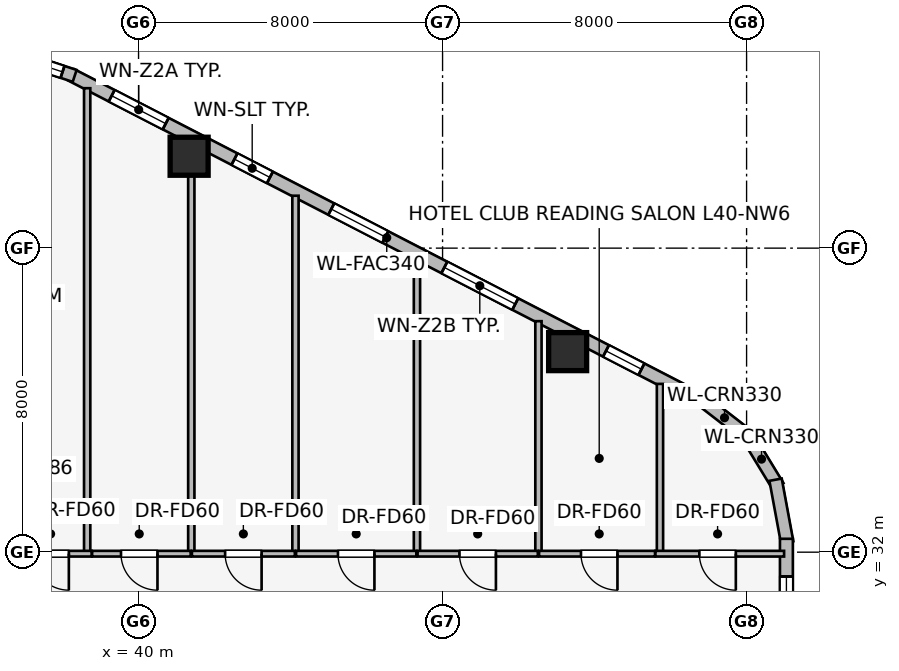
"""IFC4 building model, lengths in metres.
Left out: names, types, materials, properties, quantities, classifications, styles, units other than length and angle.
Written with IfcOpenShell. Run it as: python <this file> out.ifc"""

import sys

from ifc_helpers import new_model, si_unit, direction, frame, frame_2d, origin, origin_2d, place, context, subcontext, project, spatial, rectangle, extrude, element, fill, save


model = new_model("IFC4")
c1 = context("Model", 3, precision=1e-05, world=origin(), true_north=direction((0.0, 1.0)))
c2 = subcontext(c1, "Body", "Model", "MODEL_VIEW")
j1 = project(units=[si_unit("LENGTHUNIT", "METRE"), si_unit("PLANEANGLEUNIT", "RADIAN")], contexts=[c1])
p1 = place(None, origin())
s1 = spatial("IfcSite", under=j1, at=p1, CompositionType="ELEMENT")
p2 = place(p1, origin())
s2 = spatial("IfcBuilding", under=s1, at=p2, CompositionType="ELEMENT")
p3 = place(p2, frame((0.0, 0.0, 149.85)))
s3 = spatial("IfcBuildingStorey", under=s2, at=p3, CompositionType="ELEMENT", Elevation=149.85)
for number, where, z_axis, x_axis in (
    (1, (51.291, 37.277, 0.0), (0.0, 0.0, 1.0), (1.0, 0.0, 0.0)),
    (2, (41.331, 42.418, 0.0), (0.0, 0.0, 1.0), (1.0, 0.0, 0.0)),
):
    element("IfcColumn", number, at=place(p3, frame(where, z_axis=z_axis, x_axis=x_axis)), inside=s3, PredefinedType="COLUMN", context=c2, shape_type="SweptSolid", body=[
        extrude(rectangle(XDim=1.0, YDim=1.0, at=origin_2d()), origin(), (0.0, 0.0, 1.0), 3.45),
    ])
p4 = place(p3, frame((54.757, 36.05, 0.0), z_axis=(0.0, 0.0, 1.0), x_axis=(0.790621329885, -0.612305408053, 0.0)))
e3 = element("IfcWall", 3, at=p4, inside=s3, PredefinedType="STANDARD", context=c2, shape_type="SweptSolid", body=[
    extrude(rectangle(XDim=1.676, YDim=0.33, at=frame_2d((0.838, 0.0))), origin(), (0.0, 0.0, 1.0), 3.19),
])
p5 = place(p3, frame((55.957, 35.164, 0.0), z_axis=(0.0, 0.0, 1.0), x_axis=(0.520519429557, -0.853849824883, 0.0)))
e4 = element("IfcWall", 4, at=p5, inside=s3, PredefinedType="STANDARD", context=c2, shape_type="SweptSolid", body=[
    extrude(rectangle(XDim=1.677, YDim=0.33, at=frame_2d((0.839, 0.0))), origin(), (0.0, 0.0, 1.0), 3.19),
])
p6 = place(p3, frame((56.763, 33.907, 0.0), z_axis=(0.0, 0.0, 1.0), x_axis=(0.181984991895, -0.983301308209, 0.0)))
e5 = element("IfcWall", 5, at=p6, inside=s3, PredefinedType="STANDARD", context=c2, shape_type="SweptSolid", body=[
    extrude(rectangle(XDim=1.677, YDim=0.33, at=frame_2d((0.838, 0.0))), origin(), (0.0, 0.0, 1.0), 3.19),
])
p7 = place(p3, frame((38.231, 44.558, 0.0), z_axis=(0.0, 0.0, 1.0), x_axis=(0.888613612362, -0.458656568606, 0.0)))
e6 = element("IfcWall", 6, at=p7, inside=s3, PredefinedType="STANDARD", context=c2, shape_type="SweptSolid", body=[
    extrude(rectangle(XDim=18.681, YDim=0.34, at=frame_2d((9.34, 0.0))), origin(), (0.0, 0.0, 1.0), 3.19),
])
p8 = place(p7, frame((1.195, 0.0, 0.75)))
e7 = element("IfcOpeningElement", 7, at=p8, cuts=e6, PredefinedType="OPENING", context=c2, shape_type="SweptSolid", body=[
    extrude(rectangle(XDim=1.6, YDim=1.55, at=frame_2d((0.8, 0.775))), frame((0.0, 0.18, 0.0), z_axis=(0.0, -1.0, 0.0), x_axis=(1.0, 0.0, 0.0)), (0.0, 0.0, 1.0), 0.36),
])
p9 = place(p7, frame((4.831, 0.0, 0.75)))
e8 = element("IfcOpeningElement", 8, at=p9, cuts=e6, PredefinedType="OPENING", context=c2, shape_type="SweptSolid", body=[
    extrude(rectangle(XDim=1.05, YDim=1.4, at=frame_2d((0.525, 0.7))), frame((0.0, 0.18, 0.0), z_axis=(0.0, -1.0, 0.0), x_axis=(1.0, 0.0, 0.0)), (0.0, 0.0, 1.0), 0.36),
])
p10 = place(p7, frame((7.698, 0.0, 0.75)))
e9 = element("IfcOpeningElement", 9, at=p10, cuts=e6, PredefinedType="OPENING", context=c2, shape_type="SweptSolid", body=[
    extrude(rectangle(XDim=1.6, YDim=1.55, at=frame_2d((0.8, 0.775))), frame((0.0, 0.18, 0.0), z_axis=(0.0, -1.0, 0.0), x_axis=(1.0, 0.0, 0.0)), (0.0, 0.0, 1.0), 0.36),
])
p11 = place(p7, frame((11.046, 0.0, 0.75)))
e10 = element("IfcOpeningElement", 10, at=p11, cuts=e6, PredefinedType="OPENING", context=c2, shape_type="SweptSolid", body=[
    extrude(rectangle(XDim=2.1, YDim=1.5, at=frame_2d((1.05, 0.75))), frame((0.0, 0.18, 0.0), z_axis=(0.0, -1.0, 0.0), x_axis=(1.0, 0.0, 0.0)), (0.0, 0.0, 1.0), 0.36),
])
p12 = place(p7, frame((15.833, 0.0, 0.75)))
e11 = element("IfcOpeningElement", 11, at=p12, cuts=e6, PredefinedType="OPENING", context=c2, shape_type="SweptSolid", body=[
    extrude(rectangle(XDim=1.05, YDim=1.4, at=frame_2d((0.525, 0.7))), frame((0.0, 0.18, 0.0), z_axis=(0.0, -1.0, 0.0), x_axis=(1.0, 0.0, 0.0)), (0.0, 0.0, 1.0), 0.36),
])
p13 = place(p3, frame((36.683, 45.07, 0.0), z_axis=(0.0, 0.0, 1.0), x_axis=(0.949937416267, -0.312440242569, 0.0)))
e12 = element("IfcWall", 12, at=p13, inside=s3, PredefinedType="STANDARD", context=c2, shape_type="SweptSolid", body=[
    extrude(rectangle(XDim=1.722, YDim=0.33, at=frame_2d((0.861, 0.0))), origin(), (0.0, 0.0, 1.0), 3.19),
])
p14 = place(p13, frame((0.336, 0.0, 0.75)))
e13 = element("IfcOpeningElement", 13, at=p14, cuts=e12, PredefinedType="OPENING", context=c2, shape_type="SweptSolid", body=[
    extrude(rectangle(XDim=1.05, YDim=1.4, at=frame_2d((0.525, 0.7))), frame((0.0, 0.175, 0.0), z_axis=(0.0, -1.0, 0.0), x_axis=(1.0, 0.0, 0.0)), (0.0, 0.0, 1.0), 0.35),
])
p15 = place(p3, frame((57.048, 32.352, 0.0), z_axis=(0.0, 0.0, 1.0), x_axis=(0.0, -1.0, 0.0)))
e14 = element("IfcWall", 14, at=p15, inside=s3, PredefinedType="STANDARD", context=c2, shape_type="SweptSolid", body=[
    extrude(rectangle(XDim=16.704, YDim=0.34, at=frame_2d((8.352, 0.0))), origin(), (0.0, 0.0, 1.0), 3.19),
])
p16 = place(p15, frame((0.992, 0.0, 0.75)))
e15 = element("IfcOpeningElement", 15, at=p16, cuts=e14, PredefinedType="OPENING", context=c2, shape_type="SweptSolid", body=[
    extrude(rectangle(XDim=1.05, YDim=1.4, at=frame_2d((0.525, 0.7))), frame((0.0, 0.18, 0.0), z_axis=(0.0, -1.0, 0.0), x_axis=(1.0, 0.0, 0.0)), (0.0, 0.0, 1.0), 0.36),
])
p17 = place(p15, frame((4.935, 0.0, 0.75)))
e16 = element("IfcOpeningElement", 16, at=p17, cuts=e14, PredefinedType="OPENING", context=c2, shape_type="SweptSolid", body=[
    extrude(rectangle(XDim=2.1, YDim=1.5, at=frame_2d((1.05, 0.75))), frame((0.0, 0.18, 0.0), z_axis=(0.0, -1.0, 0.0), x_axis=(1.0, 0.0, 0.0)), (0.0, 0.0, 1.0), 0.36),
])
p18 = place(p15, frame((9.919, 0.0, 0.75)))
e17 = element("IfcOpeningElement", 17, at=p18, cuts=e14, PredefinedType="OPENING", context=c2, shape_type="SweptSolid", body=[
    extrude(rectangle(XDim=1.6, YDim=1.55, at=frame_2d((0.8, 0.775))), frame((0.0, 0.18, 0.0), z_axis=(0.0, -1.0, 0.0), x_axis=(1.0, 0.0, 0.0)), (0.0, 0.0, 1.0), 0.36),
])
p19 = place(p15, frame((14.702, 0.0, 0.75)))
e18 = element("IfcOpeningElement", 18, at=p19, cuts=e14, PredefinedType="OPENING", context=c2, shape_type="SweptSolid", body=[
    extrude(rectangle(XDim=1.05, YDim=1.4, at=frame_2d((0.525, 0.7))), frame((0.0, 0.18, 0.0), z_axis=(0.0, -1.0, 0.0), x_axis=(1.0, 0.0, 0.0)), (0.0, 0.0, 1.0), 0.36),
])
p20 = place(p3, frame((38.648, 31.97, 0.0), z_axis=(0.0, 0.0, 1.0), x_axis=(0.0, 1.0, 0.0)))
e19 = element("IfcWall", 19, at=p20, inside=s3, PredefinedType="PARTITIONING", context=c2, shape_type="SweptSolid", body=[
    extrude(rectangle(XDim=12.238, YDim=0.165, at=frame_2d((6.119, 0.0))), origin(), (0.0, 0.0, 1.0), 3.19),
])
p21 = place(p3, frame((41.388, 31.97, 0.0), z_axis=(0.0, 0.0, 1.0), x_axis=(0.0, 1.0, 0.0)))
e20 = element("IfcWall", 20, at=p21, inside=s3, PredefinedType="PARTITIONING", context=c2, shape_type="SweptSolid", body=[
    extrude(rectangle(XDim=10.823, YDim=0.165, at=frame_2d((5.412, 0.0))), origin(), (0.0, 0.0, 1.0), 2.42),
])
p22 = place(p3, frame((44.129, 31.97, 0.0), z_axis=(0.0, 0.0, 1.0), x_axis=(0.0, 1.0, 0.0)))
e21 = element("IfcWall", 21, at=p22, inside=s3, PredefinedType="PARTITIONING", context=c2, shape_type="SweptSolid", body=[
    extrude(rectangle(XDim=9.409, YDim=0.165, at=frame_2d((4.705, 0.0))), origin(), (0.0, 0.0, 1.0), 3.19),
])
p23 = place(p3, frame((47.326, 31.97, 0.0), z_axis=(0.0, 0.0, 1.0), x_axis=(0.0, 1.0, 0.0)))
e22 = element("IfcWall", 22, at=p23, inside=s3, PredefinedType="PARTITIONING", context=c2, shape_type="SweptSolid", body=[
    extrude(rectangle(XDim=7.759, YDim=0.165, at=frame_2d((3.879, 0.0))), origin(), (0.0, 0.0, 1.0), 3.19),
])
p24 = place(p3, frame((50.523, 31.97, 0.0), z_axis=(0.0, 0.0, 1.0), x_axis=(0.0, 1.0, 0.0)))
e23 = element("IfcWall", 23, at=p24, inside=s3, PredefinedType="PARTITIONING", context=c2, shape_type="SweptSolid", body=[
    extrude(rectangle(XDim=6.108, YDim=0.165, at=frame_2d((3.054, 0.0))), origin(), (0.0, 0.0, 1.0), 3.19),
])
p25 = place(p3, frame((53.721, 31.97, 0.0), z_axis=(0.0, 0.0, 1.0), x_axis=(0.0, 1.0, 0.0)))
e24 = element("IfcWall", 24, at=p25, inside=s3, PredefinedType="PARTITIONING", context=c2, shape_type="SweptSolid", body=[
    extrude(rectangle(XDim=4.458, YDim=0.165, at=frame_2d((2.229, 0.0))), origin(), (0.0, 0.0, 1.0), 3.19),
])
p26 = place(p3, frame((38.768, 31.96, 0.0), z_axis=(0.0, 0.0, 1.0), x_axis=(-1.0, 0.0, 0.0)))
e25 = element("IfcWall", 25, at=p26, inside=s3, PredefinedType="PARTITIONING", context=c2, shape_type="SweptSolid", body=[
    extrude(rectangle(XDim=4.478, YDim=0.15, at=frame_2d((2.239, 0.0))), origin(), (0.0, 0.0, 1.0), 3.19),
])
p27 = place(p26, frame((0.602, 0.0, 0.0)))
e26 = element("IfcOpeningElement", 26, at=p27, cuts=e25, PredefinedType="OPENING", context=c2, shape_type="SweptSolid", body=[
    extrude(rectangle(XDim=0.96, YDim=2.0, at=frame_2d((0.48, 1.0))), frame((0.0, 0.085, 0.0), z_axis=(0.0, -1.0, 0.0), x_axis=(1.0, 0.0, 0.0)), (0.0, 0.0, 1.0), 0.17),
])
p28 = place(p3, frame((41.372, 31.96, 0.0), z_axis=(0.0, 0.0, 1.0), x_axis=(-1.0, 0.0, 0.0)))
e27 = element("IfcWall", 27, at=p28, inside=s3, PredefinedType="PARTITIONING", context=c2, shape_type="SweptSolid", body=[
    extrude(rectangle(XDim=2.594, YDim=0.15, at=frame_2d((1.297, 0.0))), origin(), (0.0, 0.0, 1.0), 3.19),
])
p29 = place(p28, frame((0.874, 0.0, 0.0)))
e28 = element("IfcOpeningElement", 28, at=p29, cuts=e27, PredefinedType="OPENING", context=c2, shape_type="SweptSolid", body=[
    extrude(rectangle(XDim=0.96, YDim=2.0, at=frame_2d((0.48, 1.0))), frame((0.0, 0.085, 0.0), z_axis=(0.0, -1.0, 0.0), x_axis=(1.0, 0.0, 0.0)), (0.0, 0.0, 1.0), 0.17),
])
p30 = place(p3, frame((44.113, 31.96, 0.0), z_axis=(0.0, 0.0, 1.0), x_axis=(-1.0, 0.0, 0.0)))
e29 = element("IfcWall", 29, at=p30, inside=s3, PredefinedType="PARTITIONING", context=c2, shape_type="SweptSolid", body=[
    extrude(rectangle(XDim=2.709, YDim=0.15, at=frame_2d((1.354, 0.0))), origin(), (0.0, 0.0, 1.0), 3.19),
])
p31 = place(p30, frame((0.875, 0.0, 0.0)))
e30 = element("IfcOpeningElement", 30, at=p31, cuts=e29, PredefinedType="OPENING", context=c2, shape_type="SweptSolid", body=[
    extrude(rectangle(XDim=0.96, YDim=2.0, at=frame_2d((0.48, 1.0))), frame((0.0, 0.085, 0.0), z_axis=(0.0, -1.0, 0.0), x_axis=(1.0, 0.0, 0.0)), (0.0, 0.0, 1.0), 0.17),
])
p32 = place(p3, frame((47.31, 31.96, 0.0), z_axis=(0.0, 0.0, 1.0), x_axis=(-1.0, 0.0, 0.0)))
e31 = element("IfcWall", 31, at=p32, inside=s3, PredefinedType="PARTITIONING", context=c2, shape_type="SweptSolid", body=[
    extrude(rectangle(XDim=3.165, YDim=0.15, at=frame_2d((1.583, 0.0))), origin(), (0.0, 0.0, 1.0), 3.19),
])
p33 = place(p32, frame((1.103, 0.0, 0.0)))
e32 = element("IfcOpeningElement", 32, at=p33, cuts=e31, PredefinedType="OPENING", context=c2, shape_type="SweptSolid", body=[
    extrude(rectangle(XDim=0.96, YDim=2.0, at=frame_2d((0.48, 1.0))), frame((0.0, 0.085, 0.0), z_axis=(0.0, -1.0, 0.0), x_axis=(1.0, 0.0, 0.0)), (0.0, 0.0, 1.0), 0.17),
])
p34 = place(p3, frame((50.507, 31.96, 0.0), z_axis=(0.0, 0.0, 1.0), x_axis=(-1.0, 0.0, 0.0)))
e33 = element("IfcWall", 33, at=p34, inside=s3, PredefinedType="PARTITIONING", context=c2, shape_type="SweptSolid", body=[
    extrude(rectangle(XDim=3.165, YDim=0.15, at=frame_2d((1.583, 0.0))), origin(), (0.0, 0.0, 1.0), 3.19),
])
p35 = place(p34, frame((1.103, 0.0, 0.0)))
e34 = element("IfcOpeningElement", 34, at=p35, cuts=e33, PredefinedType="OPENING", context=c2, shape_type="SweptSolid", body=[
    extrude(rectangle(XDim=0.96, YDim=2.0, at=frame_2d((0.48, 1.0))), frame((0.0, 0.085, 0.0), z_axis=(0.0, -1.0, 0.0), x_axis=(1.0, 0.0, 0.0)), (0.0, 0.0, 1.0), 0.17),
])
p36 = place(p3, frame((53.591, 31.96, 0.0), z_axis=(0.0, 0.0, 1.0), x_axis=(-1.0, 0.0, 0.0)))
e35 = element("IfcWall", 35, at=p36, inside=s3, PredefinedType="PARTITIONING", context=c2, shape_type="SweptSolid", body=[
    extrude(rectangle(XDim=3.052, YDim=0.15, at=frame_2d((1.526, 0.0))), origin(), (0.0, 0.0, 1.0), 3.19),
])
p37 = place(p36, frame((0.989, 0.0, 0.0)))
e36 = element("IfcOpeningElement", 36, at=p37, cuts=e35, PredefinedType="OPENING", context=c2, shape_type="SweptSolid", body=[
    extrude(rectangle(XDim=0.96, YDim=2.0, at=frame_2d((0.48, 1.0))), frame((0.0, 0.085, 0.0), z_axis=(0.0, -1.0, 0.0), x_axis=(1.0, 0.0, 0.0)), (0.0, 0.0, 1.0), 0.17),
])
p38 = place(p3, frame((56.987, 31.96, 0.0), z_axis=(0.0, 0.0, 1.0), x_axis=(-1.0, 0.0, 0.0)))
e37 = element("IfcWall", 37, at=p38, inside=s3, PredefinedType="PARTITIONING", context=c2, shape_type="SweptSolid", body=[
    extrude(rectangle(XDim=3.386, YDim=0.15, at=frame_2d((1.693, 0.0))), origin(), (0.0, 0.0, 1.0), 3.19),
])
p39 = place(p38, frame((1.27, 0.0, 0.0)))
e38 = element("IfcOpeningElement", 38, at=p39, cuts=e37, PredefinedType="OPENING", context=c2, shape_type="SweptSolid", body=[
    extrude(rectangle(XDim=0.96, YDim=2.0, at=frame_2d((0.48, 1.0))), frame((0.0, 0.085, 0.0), z_axis=(0.0, -1.0, 0.0), x_axis=(1.0, 0.0, 0.0)), (0.0, 0.0, 1.0), 0.17),
])
p40 = place(p8, origin())
e39 = element("IfcWindow", 39, at=p40, inside=s3, PartitioningType="SINGLE_PANEL", PredefinedType="WINDOW", context=c2, shape_type="SweptSolid", body=[
    extrude(rectangle(XDim=1.6, YDim=1.55, at=frame_2d((0.8, 0.775))), frame((0.0, 0.03, 0.0), z_axis=(0.0, -1.0, 0.0), x_axis=(1.0, 0.0, 0.0)), (0.0, 0.0, 1.0), 0.06),
])
fill(e7, e39)
p41 = place(p9, origin())
e40 = element("IfcWindow", 40, at=p41, inside=s3, PartitioningType="SINGLE_PANEL", PredefinedType="WINDOW", context=c2, shape_type="SweptSolid", body=[
    extrude(rectangle(XDim=1.05, YDim=1.4, at=frame_2d((0.525, 0.7))), frame((0.0, 0.03, 0.0), z_axis=(0.0, -1.0, 0.0), x_axis=(1.0, 0.0, 0.0)), (0.0, 0.0, 1.0), 0.06),
])
fill(e8, e40)
p42 = place(p10, origin())
e41 = element("IfcWindow", 41, at=p42, inside=s3, PartitioningType="SINGLE_PANEL", PredefinedType="WINDOW", context=c2, shape_type="SweptSolid", body=[
    extrude(rectangle(XDim=1.6, YDim=1.55, at=frame_2d((0.8, 0.775))), frame((0.0, 0.03, 0.0), z_axis=(0.0, -1.0, 0.0), x_axis=(1.0, 0.0, 0.0)), (0.0, 0.0, 1.0), 0.06),
])
fill(e9, e41)
p43 = place(p11, origin())
e42 = element("IfcWindow", 42, at=p43, inside=s3, PartitioningType="SINGLE_PANEL", PredefinedType="WINDOW", context=c2, shape_type="SweptSolid", body=[
    extrude(rectangle(XDim=2.1, YDim=1.5, at=frame_2d((1.05, 0.75))), frame((0.0, 0.03, 0.0), z_axis=(0.0, -1.0, 0.0), x_axis=(1.0, 0.0, 0.0)), (0.0, 0.0, 1.0), 0.06),
])
fill(e10, e42)
p44 = place(p12, origin())
e43 = element("IfcWindow", 43, at=p44, inside=s3, PartitioningType="SINGLE_PANEL", PredefinedType="WINDOW", context=c2, shape_type="SweptSolid", body=[
    extrude(rectangle(XDim=1.05, YDim=1.4, at=frame_2d((0.525, 0.7))), frame((0.0, 0.03, 0.0), z_axis=(0.0, -1.0, 0.0), x_axis=(1.0, 0.0, 0.0)), (0.0, 0.0, 1.0), 0.06),
])
fill(e11, e43)
p45 = place(p14, origin())
e44 = element("IfcWindow", 44, at=p45, inside=s3, PartitioningType="SINGLE_PANEL", PredefinedType="WINDOW", context=c2, shape_type="SweptSolid", body=[
    extrude(rectangle(XDim=1.05, YDim=1.4, at=frame_2d((0.525, 0.7))), frame((0.0, 0.03, 0.0), z_axis=(0.0, -1.0, 0.0), x_axis=(1.0, 0.0, 0.0)), (0.0, 0.0, 1.0), 0.06),
])
fill(e13, e44)
p46 = place(p16, origin())
e45 = element("IfcWindow", 45, at=p46, inside=s3, PartitioningType="SINGLE_PANEL", PredefinedType="WINDOW", context=c2, shape_type="SweptSolid", body=[
    extrude(rectangle(XDim=1.05, YDim=1.4, at=frame_2d((0.525, 0.7))), frame((0.0, 0.03, 0.0), z_axis=(0.0, -1.0, 0.0), x_axis=(1.0, 0.0, 0.0)), (0.0, 0.0, 1.0), 0.06),
])
fill(e15, e45)
p47 = place(p27, origin())
e46 = element("IfcDoor", 46, at=p47, inside=s3, OperationType="SINGLE_SWING_LEFT", PredefinedType="DOOR", context=c2, shape_type="SweptSolid", body=[
    extrude(rectangle(XDim=0.96, YDim=2.0, at=frame_2d((0.48, 1.0))), frame((0.0, 0.025, 0.0), z_axis=(0.0, -1.0, 0.0), x_axis=(1.0, 0.0, 0.0)), (0.0, 0.0, 1.0), 0.05),
])
fill(e26, e46)
p48 = place(p29, origin())
e47 = element("IfcDoor", 47, at=p48, inside=s3, OperationType="SINGLE_SWING_LEFT", PredefinedType="DOOR", context=c2, shape_type="SweptSolid", body=[
    extrude(rectangle(XDim=0.96, YDim=2.0, at=frame_2d((0.48, 1.0))), frame((0.0, 0.025, 0.0), z_axis=(0.0, -1.0, 0.0), x_axis=(1.0, 0.0, 0.0)), (0.0, 0.0, 1.0), 0.05),
])
fill(e28, e47)
p49 = place(p31, origin())
e48 = element("IfcDoor", 48, at=p49, inside=s3, OperationType="SINGLE_SWING_LEFT", PredefinedType="DOOR", context=c2, shape_type="SweptSolid", body=[
    extrude(rectangle(XDim=0.96, YDim=2.0, at=frame_2d((0.48, 1.0))), frame((0.0, 0.025, 0.0), z_axis=(0.0, -1.0, 0.0), x_axis=(1.0, 0.0, 0.0)), (0.0, 0.0, 1.0), 0.05),
])
fill(e30, e48)
p50 = place(p33, origin())
e49 = element("IfcDoor", 49, at=p50, inside=s3, OperationType="SINGLE_SWING_LEFT", PredefinedType="DOOR", context=c2, shape_type="SweptSolid", body=[
    extrude(rectangle(XDim=0.96, YDim=2.0, at=frame_2d((0.48, 1.0))), frame((0.0, 0.025, 0.0), z_axis=(0.0, -1.0, 0.0), x_axis=(1.0, 0.0, 0.0)), (0.0, 0.0, 1.0), 0.05),
])
fill(e32, e49)
p51 = place(p35, origin())
e50 = element("IfcDoor", 50, at=p51, inside=s3, OperationType="SINGLE_SWING_LEFT", PredefinedType="DOOR", context=c2, shape_type="SweptSolid", body=[
    extrude(rectangle(XDim=0.96, YDim=2.0, at=frame_2d((0.48, 1.0))), frame((0.0, 0.025, 0.0), z_axis=(0.0, -1.0, 0.0), x_axis=(1.0, 0.0, 0.0)), (0.0, 0.0, 1.0), 0.05),
])
fill(e34, e50)
p52 = place(p37, origin())
e51 = element("IfcDoor", 51, at=p52, inside=s3, OperationType="SINGLE_SWING_LEFT", PredefinedType="DOOR", context=c2, shape_type="SweptSolid", body=[
    extrude(rectangle(XDim=0.96, YDim=2.0, at=frame_2d((0.48, 1.0))), frame((0.0, 0.025, 0.0), z_axis=(0.0, -1.0, 0.0), x_axis=(1.0, 0.0, 0.0)), (0.0, 0.0, 1.0), 0.05),
])
fill(e36, e51)
p53 = place(p39, origin())
e52 = element("IfcDoor", 52, at=p53, inside=s3, OperationType="SINGLE_SWING_LEFT", PredefinedType="DOOR", context=c2, shape_type="SweptSolid", body=[
    extrude(rectangle(XDim=0.96, YDim=2.0, at=frame_2d((0.48, 1.0))), frame((0.0, 0.025, 0.0), z_axis=(0.0, -1.0, 0.0), x_axis=(1.0, 0.0, 0.0)), (0.0, 0.0, 1.0), 0.05),
])
fill(e38, e52)
save(model, sys.argv[1])
